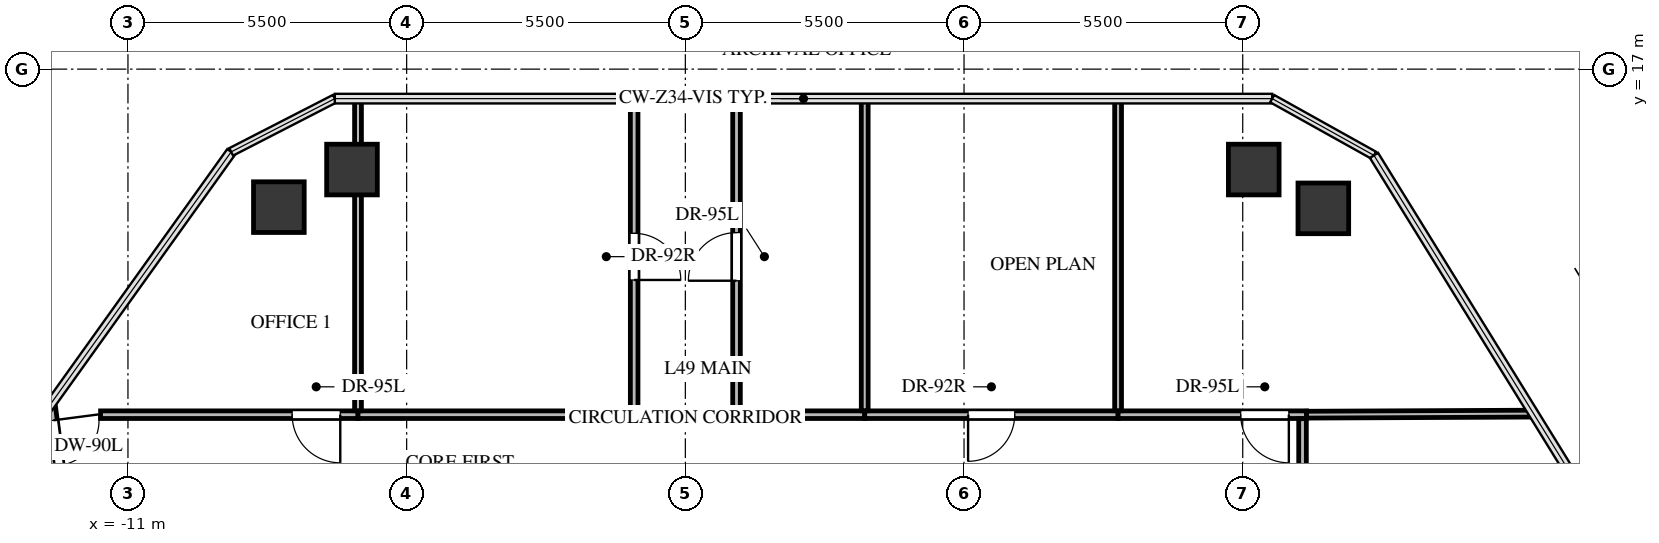
"""IFC4 building model, lengths in metres.
Left out: names, types, materials, properties, quantities, classifications, styles, units other than length and angle.
Written with IfcOpenShell. Run it as: python <this file> out.ifc"""

import sys

from ifc_helpers import new_model, si_unit, direction, frame, frame_2d, origin, origin_2d, place, context, subcontext, project, spatial, rectangle, extrude, source, transform, mapped, element, fill, save


model = new_model("IFC4")
c1 = context("Model", 3, precision=1e-05, world=origin(), true_north=direction((0.0, 1.0)))
c2 = subcontext(c1, "Body", "Model", "MODEL_VIEW")
j1 = project(units=[si_unit("LENGTHUNIT", "METRE"), si_unit("PLANEANGLEUNIT", "RADIAN")], contexts=[c1])
p1 = place(None, origin())
s1 = spatial("IfcSite", under=j1, at=p1, CompositionType="ELEMENT")
p2 = place(p1, origin())
s2 = spatial("IfcBuilding", under=s1, at=p2, CompositionType="ELEMENT")
p3 = place(p2, frame((0.0, 0.0, 180.4)))
s3 = spatial("IfcBuildingStorey", under=s2, at=p3, CompositionType="ELEMENT", Elevation=180.4)
m1 = source(origin(), c2, "Body", "SweptSolid", [
    extrude(rectangle(XDim=1.0, YDim=1.0, at=origin_2d()), origin(), (0.0, 0.0, 1.0), 3.3),
])
for number, where, z_axis, x_axis in (
    (1, (-8.022, 14.276, -0.24), (0.0, 0.0, 1.0), (1.0, 0.0, 0.0)),
    (2, (-6.579, 15.018, -0.24), (0.0, 0.0, 1.0), (1.0, 0.0, 0.0)),
    (3, (11.218, 15.018, -0.24), (0.0, 0.0, 1.0), (1.0, 0.0, 0.0)),
    (4, (12.591, 14.252, -0.24), (0.0, 0.0, 1.0), (1.0, 0.0, 0.0)),
):
    element("IfcColumn", number, at=place(p3, frame(where, z_axis=z_axis, x_axis=x_axis)), inside=s3, PredefinedType="COLUMN", context=c2, shape_type="MappedRepresentation", body=[
        mapped(m1, transform((0.0, 0.0, 0.0), x_axis=(1.0, 0.0, 0.0), y_axis=(0.0, 1.0, 0.0), z_axis=(0.0, 0.0, 1.0), scale=1.0)),
    ])
p4 = place(p3, frame((-6.46, 10.18, 0.0), z_axis=(0.0, 0.0, 1.0), x_axis=(-1.0, 0.0, 0.0)))
e5 = element("IfcWall", 5, at=p4, inside=s3, PredefinedType="PARTITIONING", context=c2, shape_type="SweptSolid", body=[
    extrude(rectangle(XDim=5.08, YDim=0.15, at=frame_2d((2.54, 0.0))), origin(), (0.0, 0.0, 1.0), 2.242),
])
p5 = place(p4, frame((0.35, 0.0, 0.0)))
e6 = element("IfcOpeningElement", 6, at=p5, cuts=e5, PredefinedType="OPENING", context=c2, shape_type="SweptSolid", body=[
    extrude(rectangle(XDim=0.95, YDim=2.1, at=frame_2d((0.475, 1.05))), frame((0.0, 0.085, 0.0), z_axis=(0.0, -1.0, 0.0), x_axis=(1.0, 0.0, 0.0)), (0.0, 0.0, 1.0), 0.17),
])
p6 = place(p3, frame((-1.01, 16.418, 0.0), z_axis=(0.0, 0.0, 1.0), x_axis=(0.0, -1.0, 0.0)))
e7 = element("IfcWall", 7, at=p6, inside=s3, PredefinedType="PARTITIONING", context=c2, shape_type="SweptSolid", body=[
    extrude(rectangle(XDim=6.238, YDim=0.15, at=frame_2d((3.119, 0.0))), origin(), (0.0, 0.0, 1.0), 2.399),
])
p7 = place(p6, frame((2.659, 0.0, 0.0)))
e8 = element("IfcOpeningElement", 8, at=p7, cuts=e7, PredefinedType="OPENING", context=c2, shape_type="SweptSolid", body=[
    extrude(rectangle(XDim=0.92, YDim=2.1, at=frame_2d((0.46, 1.05))), frame((0.0, 0.085, 0.0), z_axis=(0.0, -1.0, 0.0), x_axis=(1.0, 0.0, 0.0)), (0.0, 0.0, 1.0), 0.17),
])
p8 = place(p3, frame((-1.089, 10.18, 0.0), z_axis=(0.0, 0.0, 1.0), x_axis=(-1.0, 0.0, 0.0)))
e9 = element("IfcWall", 9, at=p8, inside=s3, PredefinedType="PARTITIONING", context=c2, shape_type="SweptSolid", body=[
    extrude(rectangle(XDim=5.371, YDim=0.15, at=frame_2d((2.686, 0.0))), origin(), (0.0, 0.0, 1.0), 2.242),
])
p9 = place(p3, frame((1.01, 10.18, 0.0), z_axis=(0.0, 0.0, 1.0), x_axis=(0.0, 1.0, 0.0)))
e10 = element("IfcWall", 10, at=p9, inside=s3, PredefinedType="PARTITIONING", context=c2, shape_type="SweptSolid", body=[
    extrude(rectangle(XDim=6.238, YDim=0.15, at=frame_2d((3.119, 0.0))), origin(), (0.0, 0.0, 1.0), 2.399),
])
p10 = place(p9, frame((2.644, 0.0, 0.0)))
e11 = element("IfcOpeningElement", 11, at=p10, cuts=e10, PredefinedType="OPENING", context=c2, shape_type="SweptSolid", body=[
    extrude(rectangle(XDim=0.95, YDim=2.1, at=frame_2d((0.475, 1.05))), frame((0.0, 0.085, 0.0), z_axis=(0.0, -1.0, 0.0), x_axis=(1.0, 0.0, 0.0)), (0.0, 0.0, 1.0), 0.17),
])
p11 = place(p3, frame((3.54, 10.18, 0.0), z_axis=(0.0, 0.0, 1.0), x_axis=(-1.0, 0.0, 0.0)))
e12 = element("IfcWall", 12, at=p11, inside=s3, PredefinedType="PARTITIONING", context=c2, shape_type="SweptSolid", body=[
    extrude(rectangle(XDim=2.451, YDim=0.15, at=frame_2d((1.226, 0.0))), origin(), (0.0, 0.0, 1.0), 3.045),
])
p12 = place(p3, frame((8.54, 10.18, 0.0), z_axis=(0.0, 0.0, 1.0), x_axis=(-1.0, 0.0, 0.0)))
e13 = element("IfcWall", 13, at=p12, inside=s3, PredefinedType="PARTITIONING", context=c2, shape_type="SweptSolid", body=[
    extrude(rectangle(XDim=5.0, YDim=0.15, at=frame_2d((2.5, 0.0))), origin(), (0.0, 0.0, 1.0), 2.608),
])
p13 = place(p12, frame((2.04, 0.0, 0.0)))
e14 = element("IfcOpeningElement", 14, at=p13, cuts=e13, PredefinedType="OPENING", context=c2, shape_type="SweptSolid", body=[
    extrude(rectangle(XDim=0.92, YDim=2.1, at=frame_2d((0.46, 1.05))), frame((0.0, 0.085, 0.0), z_axis=(0.0, -1.0, 0.0), x_axis=(1.0, 0.0, 0.0)), (0.0, 0.0, 1.0), 0.17),
])
p14 = place(p3, frame((12.26, 10.18, 0.0), z_axis=(0.0, 0.0, 1.0), x_axis=(-1.0, 0.0, 0.0)))
e15 = element("IfcWall", 15, at=p14, inside=s3, PredefinedType="PARTITIONING", context=c2, shape_type="SweptSolid", body=[
    extrude(rectangle(XDim=3.72, YDim=0.15, at=frame_2d((1.86, 0.0))), origin(), (0.0, 0.0, 1.0), 2.242),
])
p15 = place(p14, frame((0.35, 0.0, 0.0)))
e16 = element("IfcOpeningElement", 16, at=p15, cuts=e15, PredefinedType="OPENING", context=c2, shape_type="SweptSolid", body=[
    extrude(rectangle(XDim=0.95, YDim=2.1, at=frame_2d((0.475, 1.05))), frame((0.0, 0.085, 0.0), z_axis=(0.0, -1.0, 0.0), x_axis=(1.0, 0.0, 0.0)), (0.0, 0.0, 1.0), 0.17),
])
p16 = place(p3, frame((-12.514, 10.406, 0.0), z_axis=(0.0, 0.0, 1.0), x_axis=(0.129378833178, -0.991595238757, 0.0)))
e17 = element("IfcWall", 17, at=p16, inside=s3, PredefinedType="PARTITIONING", context=c2, shape_type="SweptSolid", body=[
    extrude(rectangle(XDim=1.579, YDim=0.15, at=frame_2d((0.79, 0.0))), origin(), (0.0, 0.0, 1.0), 3.045),
])
p17 = place(p16, frame((0.34, 0.0, 0.0)))
e18 = element("IfcOpeningElement", 18, at=p17, cuts=e17, PredefinedType="OPENING", context=c2, shape_type="SweptSolid", body=[
    extrude(rectangle(XDim=0.9, YDim=2.05, at=frame_2d((0.45, 1.025))), frame((0.0, 0.085, 0.0), z_axis=(0.0, -1.0, 0.0), x_axis=(1.0, 0.0, 0.0)), (0.0, 0.0, 1.0), 0.17),
])
p18 = place(p3, frame((12.18, 2.49, 0.0), z_axis=(0.0, 0.0, 1.0), x_axis=(0.0, 1.0, 0.0)))
e19 = element("IfcWall", 19, at=p18, inside=s3, PredefinedType="PARTITIONING", context=c2, shape_type="SweptSolid", body=[
    extrude(rectangle(XDim=7.611, YDim=0.15, at=frame_2d((3.806, 0.0))), origin(), (0.0, 0.0, 1.0), 3.045),
])
p19 = place(p18, frame((3.331, 0.0, 0.0)))
e20 = element("IfcOpeningElement", 20, at=p19, cuts=e19, PredefinedType="OPENING", context=c2, shape_type="SweptSolid", body=[
    extrude(rectangle(XDim=0.95, YDim=2.1, at=frame_2d((0.475, 1.05))), frame((0.0, 0.085, 0.0), z_axis=(0.0, -1.0, 0.0), x_axis=(1.0, 0.0, 0.0)), (0.0, 0.0, 1.0), 0.17),
])
p20 = place(p3, frame((-6.46, 15.102, 0.0), z_axis=(0.0, 0.0, 1.0), x_axis=(0.0, -1.0, 0.0)))
e21 = element("IfcWall", 21, at=p20, inside=s3, PredefinedType="PARTITIONING", context=c2, shape_type="SweptSolid", body=[
    extrude(rectangle(XDim=4.843, YDim=0.135, at=frame_2d((2.421, 0.0))), origin(), (0.0, 0.0, 1.0), 2.242),
])
p21 = place(p3, frame((-6.46, 16.418, 0.0), z_axis=(0.0, 0.0, 1.0), x_axis=(0.0, -1.0, 0.0)))
e22 = element("IfcWall", 22, at=p21, inside=s3, PredefinedType="PARTITIONING", context=c2, shape_type="SweptSolid", body=[
    extrude(rectangle(XDim=1.316, YDim=0.135, at=frame_2d((0.658, 0.0))), origin(), (0.0, 0.0, 1.0), 1.877),
])
for number, where, z_axis, x_axis in (
    (23, (3.54, 16.418, 0.0), (0.0, 0.0, 1.0), (0.0, -1.0, 0.0)),
    (24, (8.54, 16.418, 0.0), (0.0, 0.0, 1.0), (0.0, -1.0, 0.0)),
):
    element("IfcWall", number, at=place(p3, frame(where, z_axis=z_axis, x_axis=x_axis)), inside=s3, PredefinedType="PARTITIONING", context=c2, shape_type="SweptSolid", body=[
        extrude(rectangle(XDim=6.159, YDim=0.135, at=frame_2d((3.08, 0.0))), origin(), (0.0, 0.0, 1.0), 2.399),
    ])
p22 = place(p3, frame((16.74, 10.201, 0.0), z_axis=(0.0, 0.0, 1.0), x_axis=(-0.999989522694, -0.004577608714, 0.0)))
e25 = element("IfcWall", 25, at=p22, inside=s3, PredefinedType="PARTITIONING", context=c2, shape_type="SweptSolid", body=[
    extrude(rectangle(XDim=4.48, YDim=0.135, at=frame_2d((2.24, 0.0))), origin(), (0.0, 0.0, 1.0), 2.399),
])
m2 = source(origin(), c2, "Body", "SweptSolid", [
    extrude(rectangle(XDim=0.95, YDim=2.1, at=frame_2d((0.475, 1.05))), frame((0.0, 0.025, 0.0), z_axis=(0.0, -1.0, 0.0), x_axis=(1.0, 0.0, 0.0)), (0.0, 0.0, 1.0), 0.05),
])
p23 = place(p5, origin())
e26 = element("IfcDoor", 26, at=p23, inside=s3, OperationType="SINGLE_SWING_LEFT", PredefinedType="DOOR", context=c2, shape_type="MappedRepresentation", body=[
    mapped(m2, transform((0.0, 0.0, 0.0), x_axis=(1.0, 0.0, 0.0), y_axis=(0.0, 1.0, 0.0), z_axis=(0.0, 0.0, 1.0), scale=1.0)),
])
fill(e6, e26)
m3 = source(origin(), c2, "Body", "SweptSolid", [
    extrude(rectangle(XDim=0.92, YDim=2.1, at=frame_2d((0.46, 1.05))), frame((0.0, 0.025, 0.0), z_axis=(0.0, -1.0, 0.0), x_axis=(1.0, 0.0, 0.0)), (0.0, 0.0, 1.0), 0.05),
])
p24 = place(p7, origin())
e27 = element("IfcDoor", 27, at=p24, inside=s3, OperationType="SINGLE_SWING_RIGHT", PredefinedType="DOOR", context=c2, shape_type="MappedRepresentation", body=[
    mapped(m3, transform((0.0, 0.0, 0.0), x_axis=(1.0, 0.0, 0.0), y_axis=(0.0, 1.0, 0.0), z_axis=(0.0, 0.0, 1.0), scale=1.0)),
])
fill(e8, e27)
p25 = place(p10, origin())
e28 = element("IfcDoor", 28, at=p25, inside=s3, OperationType="SINGLE_SWING_LEFT", PredefinedType="DOOR", context=c2, shape_type="MappedRepresentation", body=[
    mapped(m2, transform((0.0, 0.0, 0.0), x_axis=(1.0, 0.0, 0.0), y_axis=(0.0, 1.0, 0.0), z_axis=(0.0, 0.0, 1.0), scale=1.0)),
])
fill(e11, e28)
p26 = place(p13, origin())
e29 = element("IfcDoor", 29, at=p26, inside=s3, OperationType="SINGLE_SWING_RIGHT", PredefinedType="DOOR", context=c2, shape_type="MappedRepresentation", body=[
    mapped(m3, transform((0.0, 0.0, 0.0), x_axis=(1.0, 0.0, 0.0), y_axis=(0.0, 1.0, 0.0), z_axis=(0.0, 0.0, 1.0), scale=1.0)),
])
fill(e14, e29)
p27 = place(p15, origin())
e30 = element("IfcDoor", 30, at=p27, inside=s3, OperationType="SINGLE_SWING_LEFT", PredefinedType="DOOR", context=c2, shape_type="MappedRepresentation", body=[
    mapped(m2, transform((0.0, 0.0, 0.0), x_axis=(1.0, 0.0, 0.0), y_axis=(0.0, 1.0, 0.0), z_axis=(0.0, 0.0, 1.0), scale=1.0)),
])
fill(e16, e30)
m4 = source(origin(), c2, "Body", "SweptSolid", [
    extrude(rectangle(XDim=0.9, YDim=2.05, at=frame_2d((0.45, 1.025))), frame((0.0, 0.025, 0.0), z_axis=(0.0, -1.0, 0.0), x_axis=(1.0, 0.0, 0.0)), (0.0, 0.0, 1.0), 0.05),
])
p28 = place(p17, origin())
e31 = element("IfcDoor", 31, at=p28, inside=s3, OperationType="SINGLE_SWING_LEFT", PredefinedType="DOOR", context=c2, shape_type="MappedRepresentation", body=[
    mapped(m4, transform((0.0, 0.0, 0.0), x_axis=(1.0, 0.0, 0.0), y_axis=(0.0, 1.0, 0.0), z_axis=(0.0, 0.0, 1.0), scale=1.0)),
])
fill(e18, e31)
save(model, sys.argv[1])
